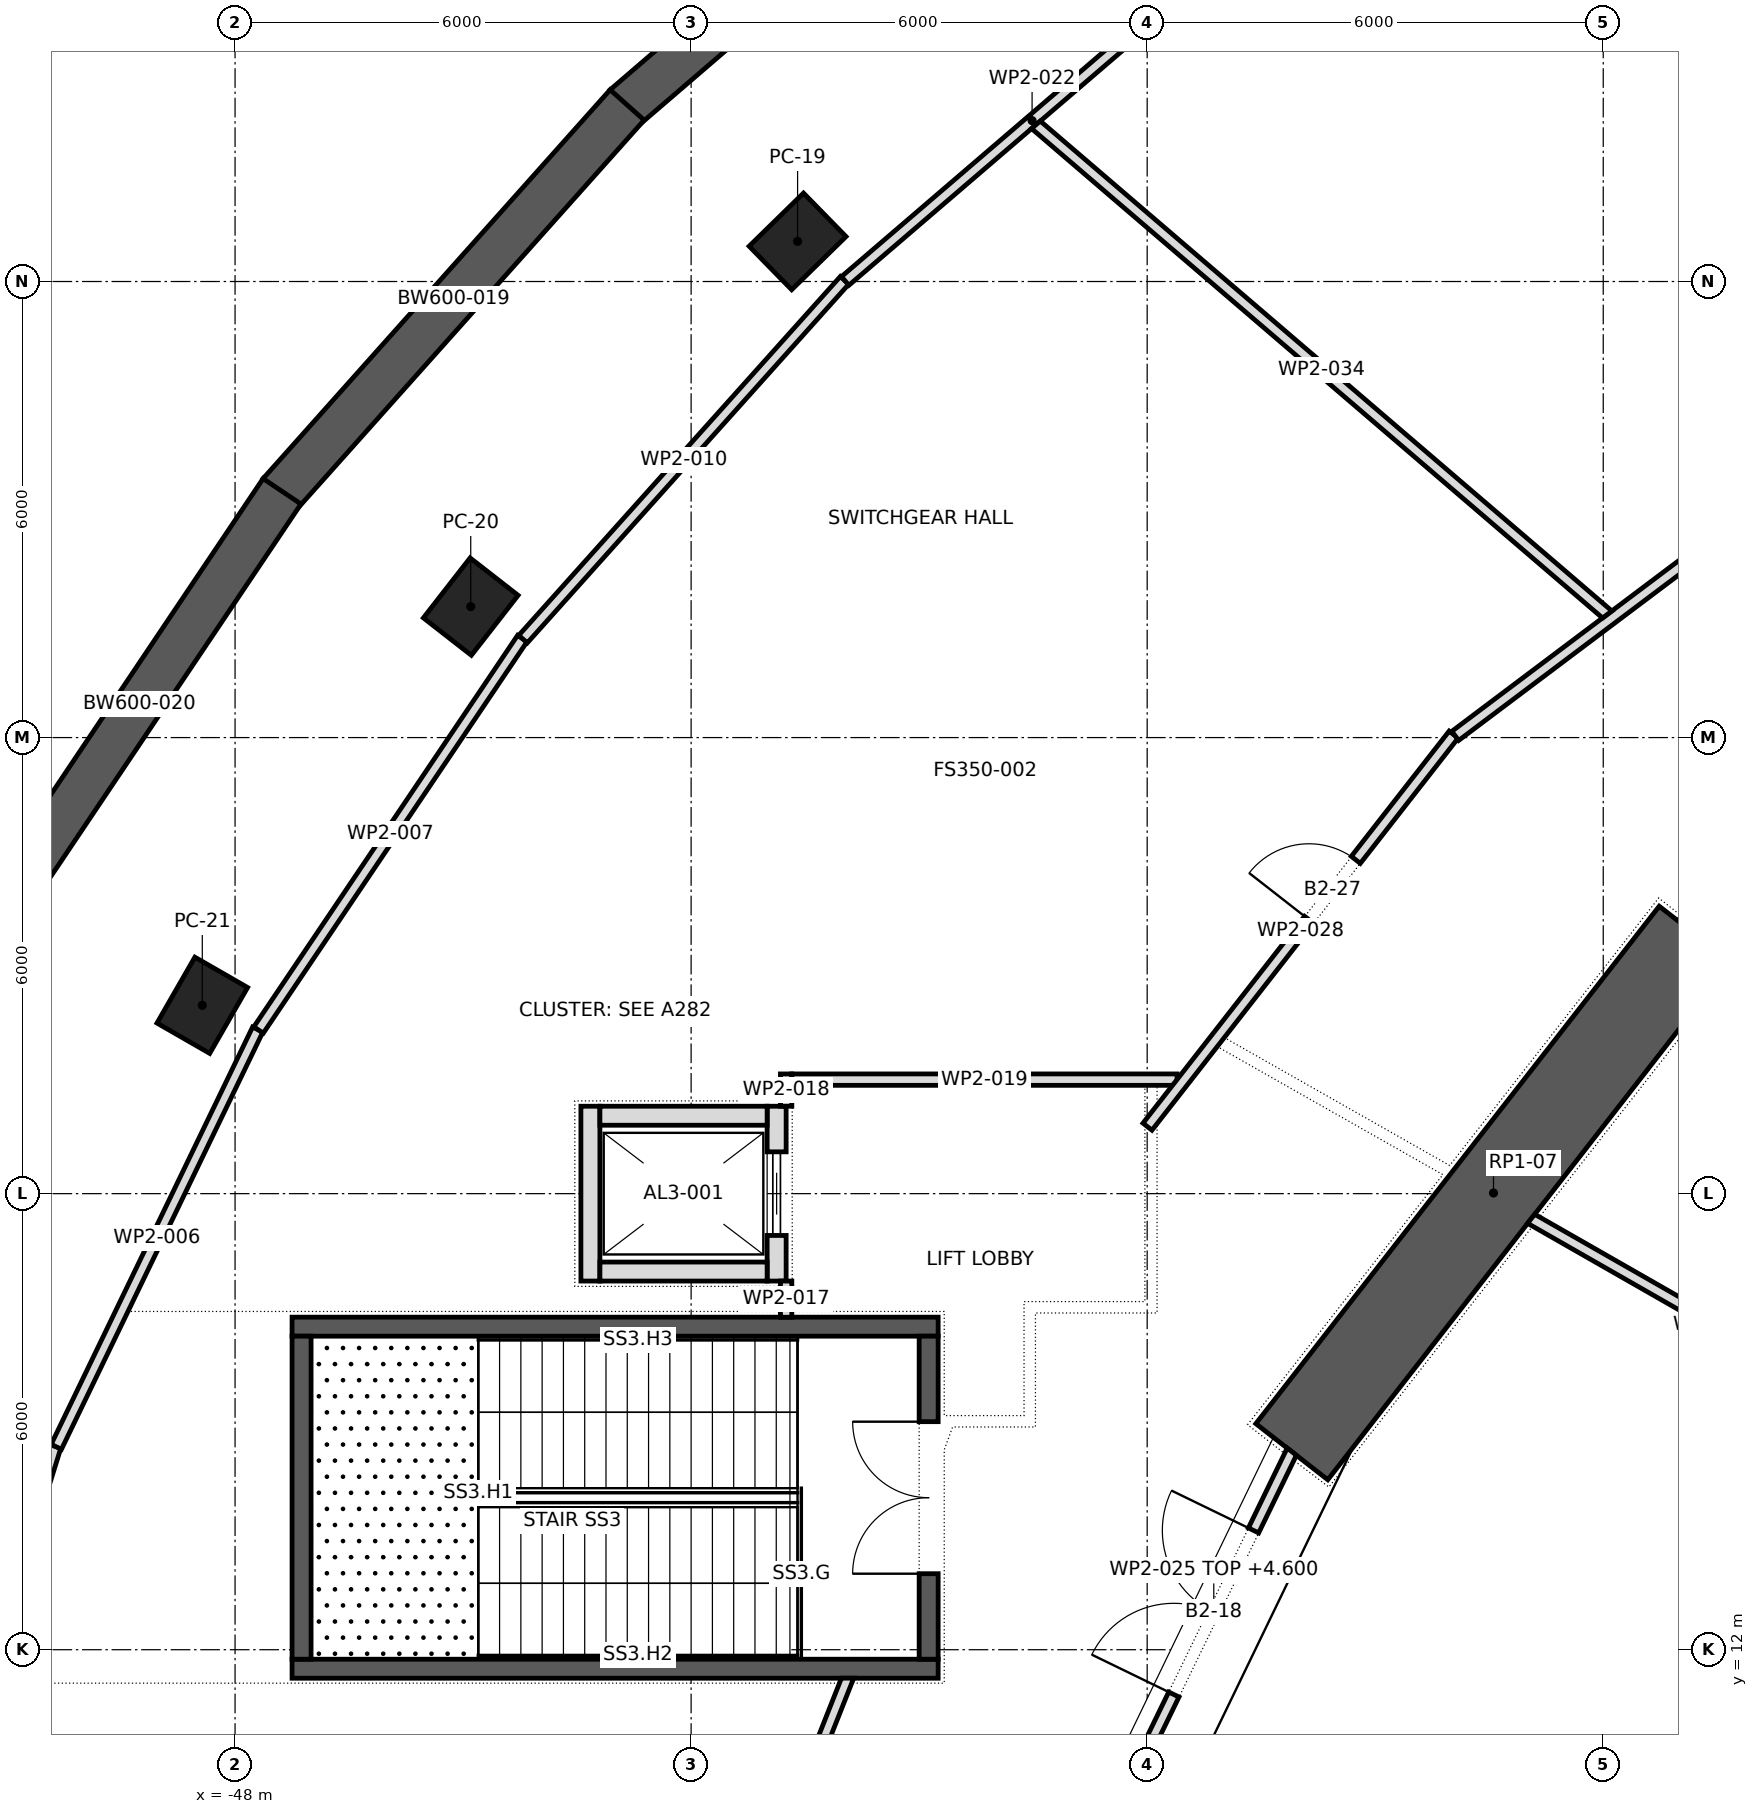
"""IFC4 building model, lengths in metres.
Left out: names, types, materials, properties, quantities, classifications, styles, units other than length and angle.
Written with IfcOpenShell. Run it as: python <this file> out.ifc"""

import sys

from ifc_helpers import new_model, si_unit, direction, frame, frame_2d, origin, origin_2d, place, context, subcontext, project, spatial, polyline, rectangle, outline, extrude, element, fill, save


model = new_model("IFC4")
c1 = context("Model", 3, precision=1e-05, world=origin(), true_north=direction((0.0, 1.0)))
c2 = subcontext(c1, "Body", "Model", "MODEL_VIEW")
j1 = project(units=[si_unit("LENGTHUNIT", "METRE"), si_unit("PLANEANGLEUNIT", "RADIAN")], contexts=[c1])
p1 = place(None, origin())
s1 = spatial("IfcSite", under=j1, at=p1, CompositionType="ELEMENT")
p2 = place(p1, origin())
s2 = spatial("IfcBuilding", under=s1, at=p2, CompositionType="ELEMENT")
p3 = place(p2, frame((0.0, 0.0, -9.5)))
s3 = spatial("IfcBuildingStorey", under=s2, at=p3, CompositionType="ELEMENT", Elevation=-9.5)
for number, where, z_axis, x_axis in (
    (1, (-40.599, 30.528, 0.0), (0.0, 0.0, 1.0), (-0.715, -0.699, 0.0)),
    (2, (-44.899, 25.723, 0.0), (0.0, 0.0, 1.0), (-0.615, -0.789, 0.0)),
    (3, (-48.431, 20.478, 0.0), (0.0, 0.0, 1.0), (-0.499, -0.867, 0.0)),
):
    element("IfcColumn", number, at=place(p3, frame(where, z_axis=z_axis, x_axis=x_axis)), inside=s3, PredefinedType="COLUMN", context=c2, shape_type="SweptSolid", body=[
        extrude(rectangle(XDim=1.0, YDim=0.8, at=origin_2d()), origin(), (0.0, 0.0, 1.0), 5.5),
    ])
p4 = place(p3, frame((-28.79, 21.412, 0.0), z_axis=(0.0, 0.0, 1.0), x_axis=(-0.614825322247, -0.788663314174, 0.0)))
e4 = element("IfcWall", 4, at=p4, inside=s3, PredefinedType="SHEAR", context=c2, shape_type="SweptSolid", body=[
    extrude(rectangle(XDim=8.632, YDim=1.2, at=frame_2d((4.316, 0.0))), origin(), (0.0, 0.0, 1.0), 5.5),
])
p5 = place(p3, frame((-37.568, 36.853, 0.0), z_axis=(0.0, 0.0, 1.0), x_axis=(-0.758319142722, -0.65188348482, 0.0)))
e5 = element("IfcWall", 5, at=p5, inside=s3, PredefinedType="SOLIDWALL", context=c2, shape_type="SweptSolid", body=[
    extrude(rectangle(XDim=6.991, YDim=0.6, at=frame_2d((3.496, 0.0))), origin(), (0.0, 0.0, 1.0), 5.5),
])
p6 = place(p3, frame((-42.842, 32.323, 0.0), z_axis=(0.0, 0.0, 1.0), x_axis=(-0.665894053378, -0.74604631872, 0.0)))
e6 = element("IfcWall", 6, at=p6, inside=s3, PredefinedType="SOLIDWALL", context=c2, shape_type="SweptSolid", body=[
    extrude(rectangle(XDim=6.856, YDim=0.6, at=frame_2d((3.428, 0.0))), origin(), (0.0, 0.0, 1.0), 5.5),
])
p7 = place(p3, frame((-47.382, 27.24, 0.0), z_axis=(0.0, 0.0, 1.0), x_axis=(-0.557518861869, -0.830164272093, 0.0)))
e7 = element("IfcWall", 7, at=p7, inside=s3, PredefinedType="SOLIDWALL", context=c2, shape_type="SweptSolid", body=[
    extrude(rectangle(XDim=6.729, YDim=0.6, at=frame_2d((3.364, 0.0))), origin(), (0.0, 0.0, 1.0), 5.5),
])
for number, where, z_axis, x_axis in (
    (8, (-47.25, 16.25, 0.0), (0.0, 0.0, 1.0), (1.0, 0.0, 0.0)),
    (9, (-47.25, 11.75, 0.0), (0.0, 0.0, 1.0), (1.0, 0.0, 0.0)),
):
    element("IfcWall", number, at=place(p3, frame(where, z_axis=z_axis, x_axis=x_axis)), inside=s3, PredefinedType="SHEAR", context=c2, shape_type="SweptSolid", body=[
        extrude(rectangle(XDim=8.5, YDim=0.25, at=frame_2d((4.25, 0.0))), origin(), (0.0, 0.0, 1.0), 5.05),
    ])
p8 = place(p3, frame((-47.125, 11.875, 0.0), z_axis=(0.0, 0.0, 1.0), x_axis=(0.0, 1.0, 0.0)))
e10 = element("IfcWall", 10, at=p8, inside=s3, PredefinedType="SHEAR", context=c2, shape_type="SweptSolid", body=[
    extrude(rectangle(XDim=4.25, YDim=0.25, at=frame_2d((2.125, 0.0))), origin(), (0.0, 0.0, 1.0), 5.05),
])
p9 = place(p3, frame((-38.875, 11.875, 0.0), z_axis=(0.0, 0.0, 1.0), x_axis=(0.0, 1.0, 0.0)))
e11 = element("IfcWall", 11, at=p9, inside=s3, PredefinedType="SHEAR", context=c2, shape_type="SweptSolid", body=[
    extrude(rectangle(XDim=4.25, YDim=0.25, at=frame_2d((2.125, 0.0))), origin(), (0.0, 0.0, 1.0), 5.05),
])
p10 = place(p9, frame((1.125, 0.0, 0.0)))
e12 = element("IfcOpeningElement", 12, at=p10, cuts=e11, PredefinedType="OPENING", context=c2, shape_type="SweptSolid", body=[
    extrude(rectangle(XDim=2.0, YDim=2.1, at=frame_2d((1.0, 1.05))), frame((0.0, 0.137, 0.0), z_axis=(0.0, -1.0, 0.0), x_axis=(1.0, 0.0, 0.0)), (0.0, 0.0, 1.0), 0.274),
])
p11 = place(p3, frame((-43.325, 16.85, 0.0), z_axis=(0.0, 0.0, 1.0), x_axis=(0.0, 1.0, 0.0)))
e13 = element("IfcWall", 13, at=p11, inside=s3, PredefinedType="PARTITIONING", context=c2, shape_type="SweptSolid", body=[
    extrude(rectangle(XDim=2.3, YDim=0.25, at=frame_2d((1.15, 0.0))), origin(), (0.0, 0.0, 1.0), 5.05),
])
p12 = place(p3, frame((-40.875, 16.85, 0.0), z_axis=(0.0, 0.0, 1.0), x_axis=(0.0, 1.0, 0.0)))
e14 = element("IfcWall", 14, at=p12, inside=s3, PredefinedType="PARTITIONING", context=c2, shape_type="SweptSolid", body=[
    extrude(rectangle(XDim=2.3, YDim=0.25, at=frame_2d((1.15, 0.0))), origin(), (0.0, 0.0, 1.0), 5.05),
])
p13 = place(p12, frame((0.6, 0.0, 0.0)))
e15 = element("IfcOpeningElement", 15, at=p13, cuts=e14, PredefinedType="OPENING", context=c2, shape_type="SweptSolid", body=[
    extrude(rectangle(XDim=1.1, YDim=2.1, at=frame_2d((0.55, 1.05))), frame((0.0, 0.137, 0.0), z_axis=(0.0, -1.0, 0.0), x_axis=(1.0, 0.0, 0.0)), (0.0, 0.0, 1.0), 0.274),
])
for number, where, z_axis, x_axis in (
    (16, (-43.2, 19.025, 0.0), (0.0, 0.0, 1.0), (1.0, 0.0, 0.0)),
    (17, (-43.2, 16.975, 0.0), (0.0, 0.0, 1.0), (1.0, 0.0, 0.0)),
):
    element("IfcWall", number, at=place(p3, frame(where, z_axis=z_axis, x_axis=x_axis)), inside=s3, PredefinedType="PARTITIONING", context=c2, shape_type="SweptSolid", body=[
        extrude(rectangle(XDim=2.2, YDim=0.25, at=frame_2d((1.1, 0.0))), origin(), (0.0, 0.0, 1.0), 5.05),
    ])
p14 = place(p3, frame((-52.154, 8.934, 0.0), z_axis=(0.0, 0.0, 1.0), x_axis=(0.297713123711, 0.954655380737, 0.0)))
e18 = element("IfcWall", 18, at=p14, inside=s3, PredefinedType="PARTITIONING", context=c2, shape_type="SweptSolid", body=[
    extrude(rectangle(XDim=6.013, YDim=0.15, at=frame_2d((3.006, 0.0))), origin(), (0.0, 0.0, 1.0), 5.05),
])
p15 = place(p3, frame((-50.352, 14.669, 0.0), z_axis=(0.0, 0.0, 1.0), x_axis=(0.434723306584, 0.900564071409, 0.0)))
e19 = element("IfcWall", 19, at=p15, inside=s3, PredefinedType="PARTITIONING", context=c2, shape_type="SweptSolid", body=[
    extrude(rectangle(XDim=6.096, YDim=0.15, at=frame_2d((3.048, 0.0))), origin(), (0.0, 0.0, 1.0), 5.05),
])
p16 = place(p3, frame((-47.691, 20.153, 0.0), z_axis=(0.0, 0.0, 1.0), x_axis=(0.558812320082, 0.829294152231, 0.0)))
e20 = element("IfcWall", 20, at=p16, inside=s3, PredefinedType="PARTITIONING", context=c2, shape_type="SweptSolid", body=[
    extrude(rectangle(XDim=6.21, YDim=0.15, at=frame_2d((3.105, 0.0))), origin(), (0.0, 0.0, 1.0), 5.05),
])
p17 = place(p3, frame((-44.211, 25.295, 0.0), z_axis=(0.0, 0.0, 1.0), x_axis=(0.6673947824, 0.744704105283, 0.0)))
e21 = element("IfcWall", 21, at=p17, inside=s3, PredefinedType="PARTITIONING", context=c2, shape_type="SweptSolid", body=[
    extrude(rectangle(XDim=6.338, YDim=0.15, at=frame_2d((3.169, 0.0))), origin(), (0.0, 0.0, 1.0), 5.05),
])
p18 = place(p3, frame((-41.699, 7.183, 0.0), z_axis=(0.0, 0.0, 1.0), x_axis=(0.367872650967, 0.929876181365, 0.0)))
e22 = element("IfcWall", 22, at=p18, inside=s3, PredefinedType="PARTITIONING", context=c2, shape_type="SweptSolid", body=[
    extrude(outline(polyline([(0.0, -0.075), (4.807, -0.075), (4.748, 0.075), (0.0, 0.075), (0.0, -0.075)])), origin(), (0.0, 0.0, 1.0), 5.05),
])
p19 = place(p3, frame((-40.75, 16.374, 0.0), z_axis=(0.0, 0.0, 1.0), x_axis=(0.0, 1.0, 0.0)))
e23 = element("IfcWall", 23, at=p19, inside=s3, PredefinedType="PARTITIONING", context=c2, shape_type="SweptSolid", body=[
    extrude(rectangle(XDim=0.476, YDim=0.15, at=frame_2d((0.238, 0.0))), origin(), (0.0, 0.0, 1.0), 5.05),
])
p20 = place(p3, frame((-40.75, 19.15, 0.0), z_axis=(0.0, 0.0, 1.0), x_axis=(0.0, 1.0, 0.0)))
e24 = element("IfcWall", 24, at=p20, inside=s3, PredefinedType="PARTITIONING", context=c2, shape_type="SweptSolid", body=[
    extrude(rectangle(XDim=0.425, YDim=0.15, at=frame_2d((0.212, 0.0))), origin(), (0.0, 0.0, 1.0), 5.05),
])
p21 = place(p3, frame((-40.675, 19.5, 0.0), z_axis=(0.0, 0.0, 1.0), x_axis=(1.0, 0.0, 0.0)))
e25 = element("IfcWall", 25, at=p21, inside=s3, PredefinedType="PARTITIONING", context=c2, shape_type="SweptSolid", body=[
    extrude(rectangle(XDim=5.068, YDim=0.15, at=frame_2d((2.534, 0.0))), origin(), (0.0, 0.0, 1.0), 5.05),
])
p22 = place(p3, frame((-39.973, 30.007, 0.0), z_axis=(0.0, 0.0, 1.0), x_axis=(0.759038455419, 0.651045791934, 0.0)))
e26 = element("IfcWall", 26, at=p22, inside=s3, PredefinedType="PARTITIONING", context=c2, shape_type="SweptSolid", body=[
    extrude(rectangle(XDim=6.479, YDim=0.15, at=frame_2d((3.24, 0.0))), origin(), (0.0, 0.0, 1.0), 5.05),
])
p23 = place(p3, frame((-36.15, 10.38, 0.0), z_axis=(0.0, 0.0, 1.0), x_axis=(0.436936398764, 0.899492403212, 0.0)))
e27 = element("IfcWall", 27, at=p23, inside=s3, PredefinedType="PARTITIONING", context=c2, shape_type="SweptSolid", body=[
    extrude(outline(polyline([(0.017, -0.075), (4.682, -0.075), (4.714, 0.075), (-0.017, 0.075), (0.017, -0.075)])), origin(), (0.0, 0.0, 1.0), 4.6),
])
p24 = place(p23, frame((1.146, 0.0, 0.0)))
e28 = element("IfcOpeningElement", 28, at=p24, cuts=e27, PredefinedType="OPENING", context=c2, shape_type="SweptSolid", body=[
    extrude(rectangle(XDim=2.4, YDim=2.1, at=frame_2d((1.2, 1.05))), frame((0.0, 0.087, 0.0), z_axis=(0.0, -1.0, 0.0), x_axis=(1.0, 0.0, 0.0)), (0.0, 0.0, 1.0), 0.174),
])
p25 = place(p3, frame((-35.996, 18.881, 0.0), z_axis=(0.0, 0.0, 1.0), x_axis=(0.615457986142, 0.788169694478, 0.0)))
e29 = element("IfcWall", 29, at=p25, inside=s3, PredefinedType="PARTITIONING", context=c2, shape_type="SweptSolid", body=[
    extrude(rectangle(XDim=6.545, YDim=0.15, at=frame_2d((3.272, 0.0))), origin(), (0.0, 0.0, 1.0), 5.05),
])
p26 = place(p25, frame((3.454, 0.0, 0.0)))
e30 = element("IfcOpeningElement", 30, at=p26, cuts=e29, PredefinedType="OPENING", context=c2, shape_type="SweptSolid", body=[
    extrude(rectangle(XDim=1.0, YDim=2.1, at=frame_2d((0.5, 1.05))), frame((0.0, 0.087, 0.0), z_axis=(0.0, -1.0, 0.0), x_axis=(1.0, 0.0, 0.0)), (0.0, 0.0, 1.0), 0.174),
])
p27 = place(p3, frame((-31.947, 24.022, 0.0), z_axis=(0.0, 0.0, 1.0), x_axis=(0.799194171191, 0.601072937949, 0.0)))
e31 = element("IfcWall", 31, at=p27, inside=s3, PredefinedType="PARTITIONING", context=c2, shape_type="SweptSolid", body=[
    extrude(rectangle(XDim=10.444, YDim=0.15, at=frame_2d((5.222, 0.0))), origin(), (0.0, 0.0, 1.0), 5.05),
])
p28 = place(p3, frame((-29.947, 25.619, 0.0), z_axis=(0.0, 0.0, 1.0), x_axis=(-0.759265306208, 0.650781218836, 0.0)))
e32 = element("IfcWall", 32, at=p28, inside=s3, PredefinedType="PARTITIONING", context=c2, shape_type="SweptSolid", body=[
    extrude(outline(polyline([(-0.017, -0.075), (9.888, -0.075), (9.911, 0.075), (0.017, 0.075), (-0.017, -0.075)])), origin(), (0.0, 0.0, 1.0), 5.05),
])
p29 = place(p3, frame((-26.074, 14.882, 0.0), z_axis=(0.0, 0.0, 1.0), x_axis=(-0.868133416031, 0.496330909746, 0.0)))
e33 = element("IfcWall", 33, at=p29, inside=s3, PredefinedType="PARTITIONING", context=c2, shape_type="SweptSolid", body=[
    extrude(outline(polyline([(0.0, -0.075), (5.604, -0.075), (5.626, 0.075), (0.0, 0.075), (0.0, -0.075)])), origin(), (0.0, 0.0, 1.0), 5.05),
])
p30 = place(p13, origin())
e34 = element("IfcDoor", 34, at=p30, inside=s3, OperationType="SLIDING_TO_LEFT", PredefinedType="DOOR", context=c2, shape_type="SweptSolid", body=[
    extrude(rectangle(XDim=1.1, YDim=2.1, at=frame_2d((0.55, 1.05))), frame((0.0, 0.025, 0.0), z_axis=(0.0, -1.0, 0.0), x_axis=(1.0, 0.0, 0.0)), (0.0, 0.0, 1.0), 0.05),
])
fill(e15, e34)
p31 = place(p10, origin())
e35 = element("IfcDoor", 35, at=p31, inside=s3, OperationType="DOUBLE_DOOR_SINGLE_SWING", PredefinedType="DOOR", context=c2, shape_type="SweptSolid", body=[
    extrude(rectangle(XDim=2.0, YDim=2.1, at=frame_2d((1.0, 1.05))), frame((0.0, 0.025, 0.0), z_axis=(0.0, -1.0, 0.0), x_axis=(1.0, 0.0, 0.0)), (0.0, 0.0, 1.0), 0.05),
])
fill(e12, e35)
p32 = place(p24, origin())
e36 = element("IfcDoor", 36, at=p32, inside=s3, OperationType="DOUBLE_DOOR_SINGLE_SWING", PredefinedType="DOOR", context=c2, shape_type="SweptSolid", body=[
    extrude(rectangle(XDim=2.4, YDim=2.1, at=frame_2d((1.2, 1.05))), frame((0.0, 0.025, 0.0), z_axis=(0.0, -1.0, 0.0), x_axis=(1.0, 0.0, 0.0)), (0.0, 0.0, 1.0), 0.05),
])
fill(e28, e36)
p33 = place(p26, origin())
e37 = element("IfcDoor", 37, at=p33, inside=s3, OperationType="SINGLE_SWING_RIGHT", PredefinedType="DOOR", context=c2, shape_type="SweptSolid", body=[
    extrude(rectangle(XDim=1.0, YDim=2.1, at=frame_2d((0.5, 1.05))), frame((0.0, 0.025, 0.0), z_axis=(0.0, -1.0, 0.0), x_axis=(1.0, 0.0, 0.0)), (0.0, 0.0, 1.0), 0.05),
])
fill(e30, e37)
save(model, sys.argv[1])
